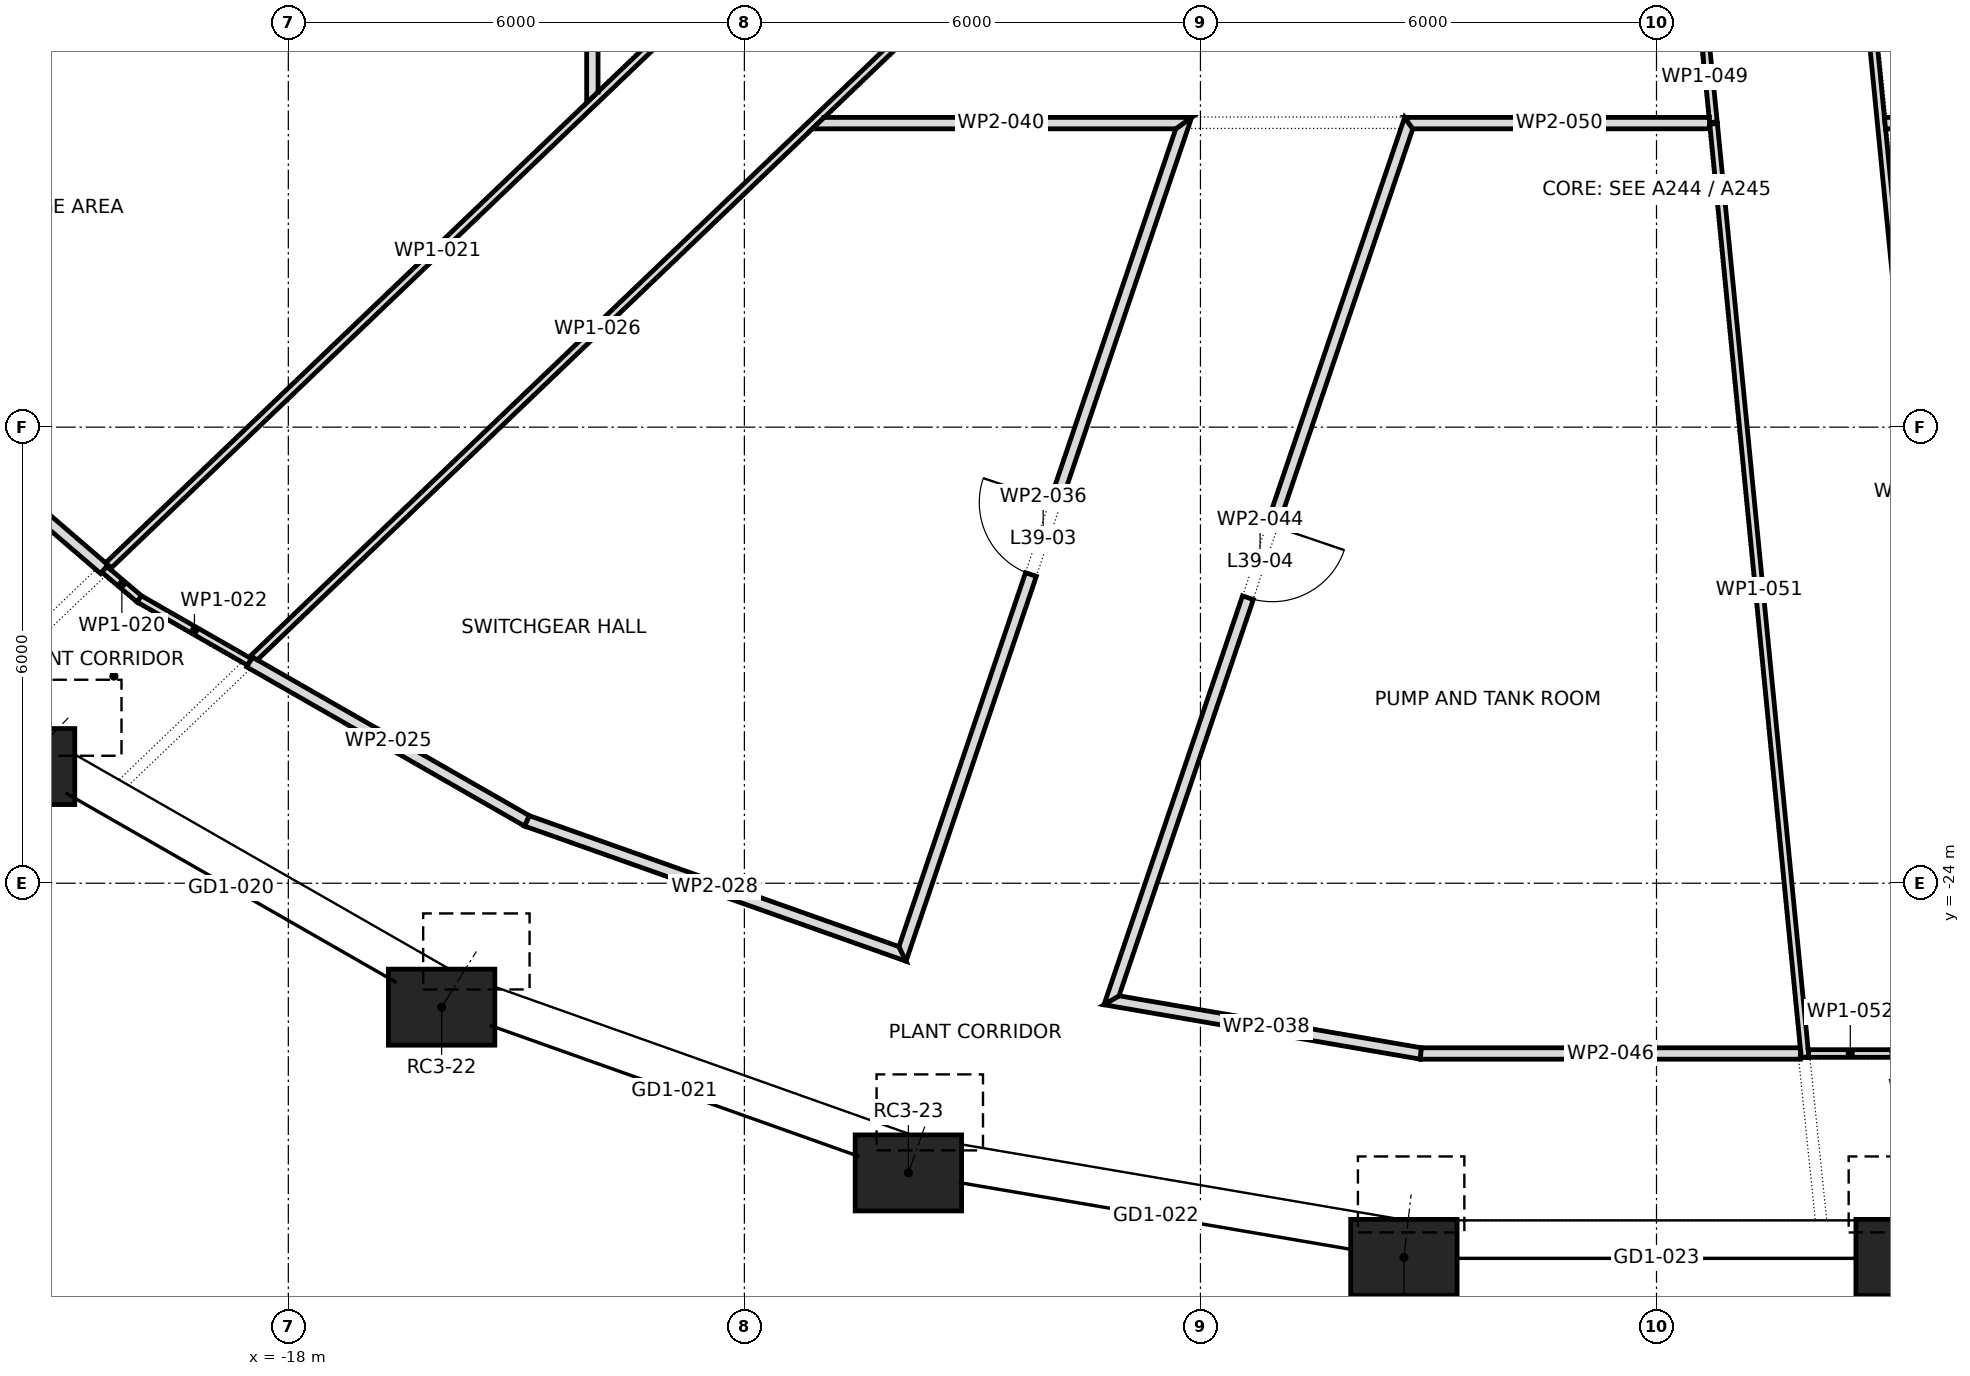
"""IFC4 building model, lengths in metres.
Left out: names, types, materials, properties, quantities, classifications, styles, units other than length and angle.
Written with IfcOpenShell. Run it as: python <this file> out.ifc"""

import sys

from ifc_helpers import new_model, si_unit, direction, frame, frame_2d, origin, origin_2d, place, context, subcontext, project, spatial, polyline, rectangle, outline, extrude, element, fill, save


model = new_model("IFC4")
c1 = context("Model", 3, precision=1e-05, world=origin(), true_north=direction((0.0, 1.0)))
c2 = subcontext(c1, "Body", "Model", "MODEL_VIEW")
j1 = project(units=[si_unit("LENGTHUNIT", "METRE"), si_unit("PLANEANGLEUNIT", "RADIAN")], contexts=[c1])
p1 = place(None, origin())
s1 = spatial("IfcSite", under=j1, at=p1, CompositionType="ELEMENT")
p2 = place(p1, origin())
s2 = spatial("IfcBuilding", under=s1, at=p2, CompositionType="ELEMENT")
p3 = place(p2, frame((0.0, 0.0, 173.5)))
s3 = spatial("IfcBuildingStorey", under=s2, at=p3, CompositionType="ELEMENT", Elevation=173.5)
p4 = place(p3, frame((-21.51, -22.465, 0.083), z_axis=(0.115812481815, 0.12096379157, 0.985877898213), x_axis=(-0.722319686129, 0.691559304059, 0.0)))
e1 = element("IfcColumn", 1, at=p4, inside=s3, PredefinedType="COLUMN", context=c2, shape_type="SweptSolid", body=[
    extrude(rectangle(XDim=1.4, YDim=1.0, at=origin_2d()), origin(), (0.0, 0.0, 1.0), 5.308),
])
p5 = place(p3, frame((-15.983, -25.631, 0.081), z_axis=(0.086138821713, 0.138107251256, 0.98666432516), x_axis=(-0.848490015543, 0.529211388316, 0.0)))
e2 = element("IfcColumn", 2, at=p5, inside=s3, PredefinedType="COLUMN", context=c2, shape_type="SweptSolid", body=[
    extrude(rectangle(XDim=1.4, YDim=1.0, at=origin_2d()), origin(), (0.0, 0.0, 1.0), 5.309),
])
p6 = place(p3, frame((-9.843, -27.811, 0.079), z_axis=(0.053064720362, 0.149997502446, 0.987261305184), x_axis=(-0.942744642547, 0.333515425352, 0.0)))
e3 = element("IfcColumn", 3, at=p6, inside=s3, PredefinedType="COLUMN", context=c2, shape_type="SweptSolid", body=[
    extrude(rectangle(XDim=1.4, YDim=1.0, at=origin_2d()), origin(), (0.0, 0.0, 1.0), 5.309),
])
for number, where, z_axis, x_axis in (
    (4, (-3.323, -28.923, 0.078), (0.018, 0.156, 0.988), (-0.993, 0.114, 0.0)),
    (5, (3.323, -28.923, 0.078), (-0.018, 0.156, 0.988), (-0.993, -0.114, 0.0)),
):
    element("IfcColumn", number, at=place(p3, frame(where, z_axis=z_axis, x_axis=x_axis)), inside=s3, PredefinedType="COLUMN", context=c2, shape_type="SweptSolid", body=[
        extrude(rectangle(XDim=1.4, YDim=1.0, at=origin_2d()), origin(), (0.0, 0.0, 1.0), 5.31),
    ])
p7 = place(p3, frame((-26.025, -14.447, 0.0), z_axis=(0.0, 0.0, 1.0), x_axis=(0.896069053311, 0.443914689663, 0.0)))
e6 = element("IfcWall", 6, at=p7, inside=s3, PredefinedType="PARTITIONING", context=c2, shape_type="SweptSolid", body=[
    extrude(outline(polyline([(0.184, -0.075), (2.057, -0.075), (3.931, -0.075), (5.805, -0.075), (7.678, -0.075), (9.552, -0.075), (11.426, -0.075), (13.299, -0.075), (13.541, 0.075), (11.606, 0.075), (9.672, 0.075), (7.738, 0.075), (5.803, 0.075), (3.869, 0.075), (1.935, 0.075), (0.0, 0.075), (0.184, -0.075)])), origin(), (0.0, 0.0, 1.0), 5.1),
])
p8 = place(p7, frame((6.256, 0.0, 0.0)))
e7 = element("IfcOpeningElement", 7, at=p8, cuts=e6, PredefinedType="OPENING", context=c2, shape_type="SweptSolid", body=[
    extrude(rectangle(XDim=1.0, YDim=2.1, at=frame_2d((0.5, 1.05))), frame((0.0, 0.087, 0.0), z_axis=(0.0, -1.0, 0.0), x_axis=(1.0, 0.0, 0.0)), (0.0, 0.0, 1.0), 0.174),
])
p9 = place(p3, frame((-24.266, -16.565, 0.0), z_axis=(0.0, 0.0, 1.0), x_axis=(0.758416508113, -0.651770205074, 0.0)))
e8 = element("IfcWall", 8, at=p9, inside=s3, PredefinedType="PARTITIONING", context=c2, shape_type="SweptSolid", body=[
    extrude(outline(polyline([(5.071, 0.075), (3.385, 0.075), (1.7, 0.075), (0.015, 0.075), (0.0, -0.074), (0.0, -0.075), (1.69, -0.075), (3.381, -0.075), (5.071, -0.075), (5.071, 0.075)])), origin(), (0.0, 0.0, 1.0), 5.1),
])
p10 = place(p3, frame((-20.42, -19.87, 0.0), z_axis=(0.0, 0.0, 1.0), x_axis=(0.762791438703, -0.646644586339, 0.0)))
e9 = element("IfcWall", 9, at=p10, inside=s3, PredefinedType="PARTITIONING", context=c2, shape_type="SweptSolid", body=[
    extrude(outline(polyline([(0.607, -0.05), (0.607, -0.049), (0.598, 0.05), (0.0, 0.05), (0.0, -0.05), (0.607, -0.05)])), origin(), (0.0, 0.0, 1.0), 5.1),
])
p11 = place(p3, frame((-20.379, -19.831, 0.0), z_axis=(0.0, 0.0, 1.0), x_axis=(0.722675408286, 0.691187568073, 0.0)))
e10 = element("IfcWall", 10, at=p11, inside=s3, PredefinedType="PARTITIONING", context=c2, shape_type="SweptSolid", body=[
    extrude(outline(polyline([(12.01, 0.05), (10.495, 0.05), (8.979, 0.05), (8.977, 0.047), (8.974, 0.05), (7.182, 0.05), (5.39, 0.05), (3.598, 0.05), (1.806, 0.05), (0.014, 0.05), (0.019, 0.007), (0.0, 0.006), (0.0, -0.05), (1.716, -0.05), (3.431, -0.05), (5.147, -0.05), (6.863, -0.05), (8.579, -0.05), (10.294, -0.05), (12.01, -0.05), (12.01, 0.05)])), origin(), (0.0, 0.0, 1.0), 5.1),
])
p12 = place(p3, frame((-19.964, -20.258, 0.0), z_axis=(0.0, 0.0, 1.0), x_axis=(0.867893204515, -0.496750828441, 0.0)))
e11 = element("IfcWall", 11, at=p12, inside=s3, PredefinedType="PARTITIONING", context=c2, shape_type="SweptSolid", body=[
    extrude(outline(polyline([(1.676, 0.05), (0.009, 0.05), (0.0, -0.05), (1.676, -0.05), (1.676, 0.05)])), origin(), (0.0, 0.0, 1.0), 5.1),
])
p13 = place(p3, frame((-18.51, -21.09, 0.0), z_axis=(0.0, 0.0, 1.0), x_axis=(0.867822013589, -0.496875188281, 0.0)))
e12 = element("IfcWall", 12, at=p13, inside=s3, PredefinedType="PARTITIONING", context=c2, shape_type="SweptSolid", body=[
    extrude(outline(polyline([(0.0, -0.075), (1.404, -0.075), (2.809, -0.075), (4.213, -0.075), (4.199, 0.075), (2.8, 0.075), (1.4, 0.075), (0.0, 0.075), (0.0, -0.075)])), origin(), (0.0, 0.0, 1.0), 5.1),
])
p14 = place(p3, frame((-18.483, -21.064, 0.0), z_axis=(0.0, 0.0, 1.0), x_axis=(0.722534616371, 0.691334743916, 0.0)))
e13 = element("IfcWall", 13, at=p14, inside=s3, PredefinedType="PARTITIONING", context=c2, shape_type="SweptSolid", body=[
    extrude(outline(polyline([(0.056, -0.05), (1.775, -0.05), (3.495, -0.05), (5.215, -0.05), (6.935, -0.05), (8.655, -0.05), (10.374, -0.05), (10.376, -0.048), (10.379, -0.05), (12.559, -0.05), (12.559, 0.05), (10.765, 0.05), (8.971, 0.05), (7.177, 0.05), (5.383, 0.05), (3.588, 0.05), (1.794, 0.05), (0.0, 0.05), (0.0, 0.05), (0.01, 0.014), (0.0, 0.011), (0.0, 0.011), (0.035, 0.021), (0.056, -0.05)])), origin(), (0.0, 0.0, 1.0), 5.1),
])
p15 = place(p3, frame((-14.866, -23.178, 0.0), z_axis=(0.0, 0.0, 1.0), x_axis=(0.942606176861, -0.333906566786, 0.0)))
e14 = element("IfcWall", 14, at=p15, inside=s3, PredefinedType="PARTITIONING", context=c2, shape_type="SweptSolid", body=[
    extrude(outline(polyline([(0.0, -0.075), (1.775, -0.075), (3.549, -0.075), (5.324, -0.075), (5.172, 0.075), (3.452, 0.075), (1.733, 0.075), (0.014, 0.075), (0.0, -0.075)])), origin(), (0.0, 0.0, 1.0), 5.1),
])
p16 = place(p3, frame((-14.0, -13.732, 0.0), z_axis=(0.0, 0.0, 1.0), x_axis=(0.0, 1.0, 0.0)))
e15 = element("IfcWall", 15, at=p16, inside=s3, PredefinedType="PARTITIONING", context=c2, shape_type="SweptSolid", body=[
    extrude(outline(polyline([(0.144, -0.075), (1.884, -0.075), (3.623, -0.075), (5.363, -0.075), (5.242, 0.0), (5.122, 0.075), (3.415, 0.075), (1.707, 0.075), (0.0, 0.075), (0.144, -0.075)])), origin(), (0.0, 0.0, 1.0), 5.1),
])
p17 = place(p3, frame((-9.944, -25.002, 0.0), z_axis=(0.0, 0.0, 1.0), x_axis=(0.320636430017, 0.947202343613, 0.0)))
e16 = element("IfcWall", 16, at=p17, inside=s3, PredefinedType="PARTITIONING", context=c2, shape_type="SweptSolid", body=[
    extrude(outline(polyline([(0.0, -0.075), (1.953, -0.075), (3.906, -0.075), (5.86, -0.075), (7.813, -0.075), (9.766, -0.075), (11.72, -0.075), (11.511, 0.075), (9.617, 0.075), (7.724, 0.075), (5.831, 0.075), (3.938, 0.075), (2.045, 0.075), (0.152, 0.075), (0.0, -0.075), (0.0, -0.075)])), origin(), (0.0, 0.0, 1.0), 5.1),
])
p18 = place(p17, frame((5.346, 0.0, 0.0)))
e17 = element("IfcOpeningElement", 17, at=p18, cuts=e16, PredefinedType="OPENING", context=c2, shape_type="SweptSolid", body=[
    extrude(rectangle(XDim=1.0, YDim=2.1, at=frame_2d((0.5, 1.05))), frame((0.0, 0.087, 0.0), z_axis=(0.0, -1.0, 0.0), x_axis=(1.0, 0.0, 0.0)), (0.0, 0.0, 1.0), 0.174),
])
p19 = place(p3, frame((-7.257, -25.525, 0.0), z_axis=(0.0, 0.0, 1.0), x_axis=(0.985526115986, -0.16952367006, 0.0)))
e18 = element("IfcWall", 18, at=p19, inside=s3, PredefinedType="PARTITIONING", context=c2, shape_type="SweptSolid", body=[
    extrude(outline(polyline([(4.224, -0.075), (4.224, -0.073), (4.211, 0.075), (2.866, 0.075), (1.521, 0.075), (0.176, 0.075), (0.0, -0.075), (1.408, -0.075), (2.816, -0.075), (4.224, -0.075)])), origin(), (0.0, 0.0, 1.0), 5.1),
])
p20 = place(p3, frame((-6.115, -14.0, 0.0), z_axis=(0.0, 0.0, 1.0), x_axis=(-1.0, 0.0, 0.0)))
e19 = element("IfcWall", 19, at=p20, inside=s3, PredefinedType="PARTITIONING", context=c2, shape_type="SweptSolid", body=[
    extrude(outline(polyline([(0.0, -0.075), (1.611, -0.075), (3.223, -0.075), (4.834, -0.075), (4.99, 0.075), (3.397, 0.075), (1.803, 0.075), (0.209, 0.075), (0.104, 0.0), (0.0, -0.075)])), origin(), (0.0, 0.0, 1.0), 5.1),
])
p21 = place(p3, frame((-3.243, -13.949, 0.0), z_axis=(0.0, 0.0, 1.0), x_axis=(-0.320918229821, -0.947106905142, 0.0)))
e20 = element("IfcWall", 20, at=p21, inside=s3, PredefinedType="PARTITIONING", context=c2, shape_type="SweptSolid", body=[
    extrude(outline(polyline([(12.326, -0.075), (12.326, -0.075), (12.15, 0.075), (10.43, 0.075), (8.71, 0.075), (6.989, 0.075), (5.269, 0.075), (3.548, 0.075), (1.828, 0.075), (0.107, 0.075), (0.0, -0.075), (0.0, -0.075), (1.761, -0.075), (3.522, -0.075), (5.282, -0.075), (7.043, -0.075), (8.804, -0.075), (10.565, -0.075), (12.326, -0.075)])), origin(), (0.0, 0.0, 1.0), 5.1),
])
p22 = place(p21, frame((5.646, 0.0, 0.0)))
e21 = element("IfcOpeningElement", 21, at=p22, cuts=e20, PredefinedType="OPENING", context=c2, shape_type="SweptSolid", body=[
    extrude(rectangle(XDim=1.0, YDim=2.1, at=frame_2d((0.5, 1.05))), frame((0.0, 0.087, 0.0), z_axis=(0.0, -1.0, 0.0), x_axis=(1.0, 0.0, 0.0)), (0.0, 0.0, 1.0), 0.174),
])
p23 = place(p3, frame((-3.106, -26.24, 0.0), z_axis=(0.0, 0.0, 1.0), x_axis=(1.0, 0.0, 0.0)))
e22 = element("IfcWall", 22, at=p23, inside=s3, PredefinedType="PARTITIONING", context=c2, shape_type="SweptSolid", body=[
    extrude(outline(polyline([(4.999, 0.075), (3.337, 0.075), (1.675, 0.075), (0.013, 0.075), (0.0, -0.075), (1.666, -0.075), (3.333, -0.075), (4.999, -0.075), (4.999, 0.075)])), origin(), (0.0, 0.0, 1.0), 5.1),
])
p24 = place(p3, frame((0.52, -11.7, 0.0), z_axis=(0.0, 0.0, 1.0), x_axis=(0.099535104197, -0.995034051192, 0.0)))
e23 = element("IfcWall", 23, at=p24, inside=s3, PredefinedType="PARTITIONING", context=c2, shape_type="SweptSolid", body=[
    extrude(outline(polyline([(0.0, -0.05), (2.231, -0.05), (2.231, -0.05), (2.233, -0.05), (2.311, -0.05), (2.311, -0.006), (2.311, 0.05), (0.0, 0.05), (0.0, -0.05)])), origin(), (0.0, 0.0, 1.0), 5.1),
])
p25 = place(p3, frame((0.707, -14.0, 0.0), z_axis=(0.0, 0.0, 1.0), x_axis=(-1.0, 0.0, 0.0)))
e24 = element("IfcWall", 24, at=p25, inside=s3, PredefinedType="PARTITIONING", context=c2, shape_type="SweptSolid", body=[
    extrude(outline(polyline([(4.021, -0.075), (4.021, -0.075), (3.967, 0.0), (3.913, 0.075), (1.957, 0.075), (0.0, 0.075), (0.0, 0.074), (0.007, 0.004), (0.007, 0.004), (0.015, -0.075), (1.35, -0.075), (2.685, -0.075), (4.021, -0.075)])), origin(), (0.0, 0.0, 1.0), 5.1),
])
p26 = place(p3, frame((0.75, -13.999, 0.0), z_axis=(0.0, 0.0, 1.0), x_axis=(0.097559905923, -0.995229654279, 0.0)))
e25 = element("IfcWall", 25, at=p26, inside=s3, PredefinedType="PARTITIONING", context=c2, shape_type="SweptSolid", body=[
    extrude(rectangle(XDim=12.35, YDim=0.1, at=frame_2d((6.175, 0.0))), origin(), (0.0, 0.0, 1.0), 5.1),
])
p27 = place(p3, frame((1.958, -26.24, 0.0), z_axis=(0.0, 0.0, 1.0), x_axis=(1.0, 0.0, 0.0)))
e26 = element("IfcWall", 26, at=p27, inside=s3, PredefinedType="PARTITIONING", context=c2, shape_type="SweptSolid", body=[
    extrude(outline(polyline([(1.147, -0.05), (1.147, -0.05), (1.143, 0.0), (1.138, 0.05), (1.138, 0.05), (1.138, 0.05), (0.038, 0.05), (0.047, -0.045), (0.0, -0.05), (0.0, -0.05), (1.147, -0.05)])), origin(), (0.0, 0.0, 1.0), 5.1),
])
p28 = place(p3, frame((2.73, -11.7, 0.0), z_axis=(0.0, 0.0, 1.0), x_axis=(0.09772373037, -0.99521358136, 0.0)))
e27 = element("IfcWall", 27, at=p28, inside=s3, PredefinedType="PARTITIONING", context=c2, shape_type="SweptSolid", body=[
    extrude(outline(polyline([(14.383, -0.05), (14.383, -0.049), (14.379, -0.004), (14.383, -0.003), (14.383, -0.003), (14.354, -0.005), (14.35, 0.05), (12.357, 0.05), (10.364, 0.05), (8.371, 0.05), (6.378, 0.05), (4.385, 0.05), (2.391, 0.05), (2.391, 0.049), (2.381, 0.05), (0.0, 0.05), (0.0, -0.05), (1.798, -0.05), (3.596, -0.05), (5.394, -0.05), (7.191, -0.05), (8.989, -0.05), (10.787, -0.05), (12.585, -0.05), (14.383, -0.05)])), origin(), (0.0, 0.0, 1.0), 5.1),
])
p29 = place(p3, frame((6.334, -14.0, 0.0), z_axis=(0.0, 0.0, 1.0), x_axis=(-1.0, 0.0, 0.0)))
e28 = element("IfcWall", 28, at=p29, inside=s3, PredefinedType="PARTITIONING", context=c2, shape_type="SweptSolid", body=[
    extrude(outline(polyline([(3.335, -0.075), (3.335, -0.072), (3.32, 0.075), (1.704, 0.075), (0.087, 0.075), (0.044, 0.0), (0.0, -0.075), (0.0, -0.075), (1.667, -0.075), (3.335, -0.075)])), origin(), (0.0, 0.0, 1.0), 5.1),
])
p30 = place(p18, origin())
e29 = element("IfcDoor", 29, at=p30, inside=s3, OperationType="SINGLE_SWING_LEFT", PredefinedType="DOOR", context=c2, shape_type="SweptSolid", body=[
    extrude(rectangle(XDim=1.0, YDim=2.1, at=frame_2d((0.5, 1.05))), frame((0.0, 0.025, 0.0), z_axis=(0.0, -1.0, 0.0), x_axis=(1.0, 0.0, 0.0)), (0.0, 0.0, 1.0), 0.05),
])
fill(e17, e29)
p31 = place(p22, origin())
e30 = element("IfcDoor", 30, at=p31, inside=s3, OperationType="SINGLE_SWING_RIGHT", PredefinedType="DOOR", context=c2, shape_type="SweptSolid", body=[
    extrude(rectangle(XDim=1.0, YDim=2.1, at=frame_2d((0.5, 1.05))), frame((0.0, 0.025, 0.0), z_axis=(0.0, -1.0, 0.0), x_axis=(1.0, 0.0, 0.0)), (0.0, 0.0, 1.0), 0.05),
])
fill(e21, e30)
save(model, sys.argv[1])
